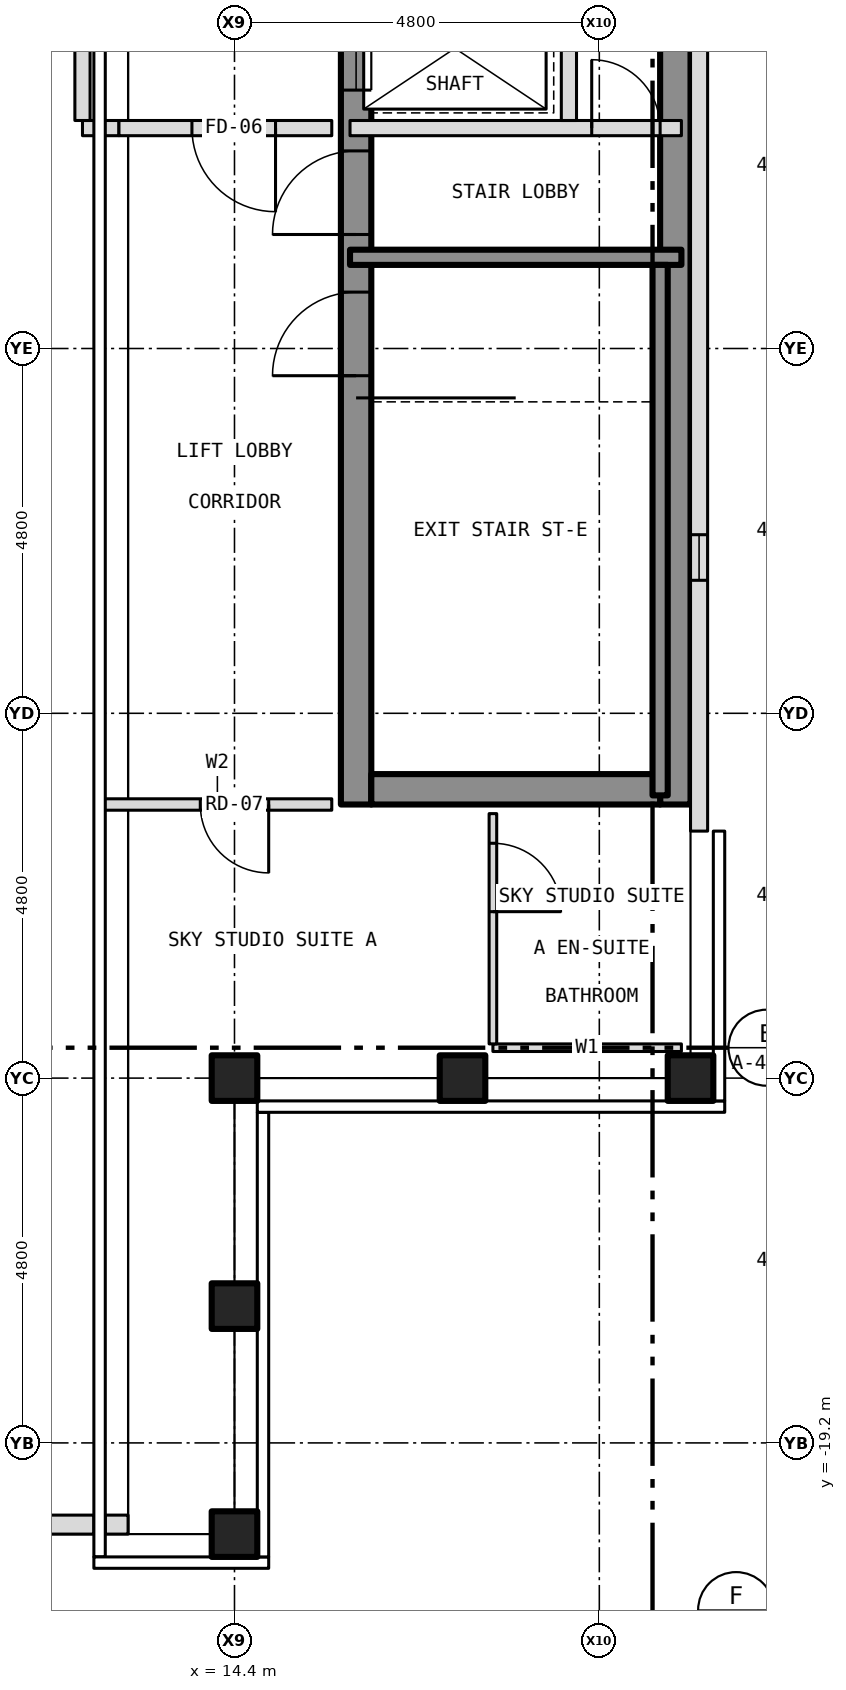
"""IFC4 building model, lengths in metres.
Left out: names, types, materials, properties, quantities, classifications, styles, units other than length and angle.
Written with IfcOpenShell. Run it as: python <this file> out.ifc"""

import sys

from ifc_helpers import new_model, si_unit, direction, frame, frame_2d, origin, origin_2d, place, context, subcontext, project, spatial, rectangle, hollow_rectangle, extrude, element, fill, save


model = new_model("IFC4")
c1 = context("Model", 3, precision=1e-05, world=origin(), true_north=direction((0.0, 1.0)))
c2 = subcontext(c1, "Body", "Model", "MODEL_VIEW")
j1 = project(units=[si_unit("LENGTHUNIT", "METRE"), si_unit("PLANEANGLEUNIT", "RADIAN")], contexts=[c1])
p1 = place(None, origin())
s1 = spatial("IfcSite", under=j1, at=p1, CompositionType="ELEMENT")
p2 = place(p1, origin())
s2 = spatial("IfcBuilding", under=s1, at=p2, CompositionType="ELEMENT")
p3 = place(p2, frame((0.0, 0.0, 286.5)))
s3 = spatial("IfcBuildingStorey", under=s2, at=p3, CompositionType="ELEMENT", Elevation=286.5)
for number, where, z_axis, x_axis in (
    (1, (14.4, -20.4, -0.15), (0.0, 0.0, 1.0), (1.0, 0.0, 0.0)),
    (2, (20.4, -14.4, -0.15), (0.0, 0.0, 1.0), (1.0, 0.0, 0.0)),
    (3, (14.4, -14.4, -0.15), (0.0, 0.0, 1.0), (1.0, 0.0, 0.0)),
    (4, (14.4, -17.4, -0.15), (0.0, 0.0, 1.0), (1.0, 0.0, 0.0)),
    (5, (17.4, -14.4, -0.15), (0.0, 0.0, 1.0), (1.0, 0.0, 0.0)),
):
    element("IfcColumn", number, at=place(p3, frame(where, z_axis=z_axis, x_axis=x_axis)), inside=s3, PredefinedType="COLUMN", context=c2, shape_type="SweptSolid", body=[
        extrude(hollow_rectangle(XDim=0.6, YDim=0.6, WallThickness=0.03, at=origin_2d()), origin(), (0.0, 0.0, 1.0), 3.45),
    ])
p4 = place(p3, frame((16.0, -10.8, 0.0), z_axis=(0.0, 0.0, 1.0), x_axis=(0.0, 1.0, 0.0)))
e6 = element("IfcWall", 6, at=p4, inside=s3, PredefinedType="SHEAR", context=c2, shape_type="SweptSolid", body=[
    extrude(rectangle(XDim=21.6, YDim=0.4, at=frame_2d((10.8, 0.0))), origin(), (0.0, 0.0, 1.0), 3.25),
])
p5 = place(p4, frame((9.4, 0.0, 0.0)))
e7 = element("IfcOpeningElement", 7, at=p5, cuts=e6, PredefinedType="OPENING", context=c2, shape_type="SweptSolid", body=[
    extrude(rectangle(XDim=1.1, YDim=2.1, at=frame_2d((0.55, 1.05))), frame((0.0, 0.212, 0.0), z_axis=(0.0, -1.0, 0.0), x_axis=(1.0, 0.0, 0.0)), (0.0, 0.0, 1.0), 0.424),
])
p6 = place(p4, frame((11.5, 0.0, 0.0)))
e8 = element("IfcOpeningElement", 8, at=p6, cuts=e6, PredefinedType="OPENING", context=c2, shape_type="SweptSolid", body=[
    extrude(rectangle(XDim=1.1, YDim=2.1, at=frame_2d((0.55, 1.05))), frame((0.0, 0.212, 0.0), z_axis=(0.0, -1.0, 0.0), x_axis=(1.0, 0.0, 0.0)), (0.0, 0.0, 1.0), 0.424),
])
p7 = place(p4, frame((13.6, 0.0, 0.0)))
e9 = element("IfcOpeningElement", 9, at=p7, cuts=e6, PredefinedType="OPENING", context=c2, shape_type="SweptSolid", body=[
    extrude(rectangle(XDim=1.1, YDim=2.1, at=frame_2d((0.55, 1.05))), frame((0.0, 0.212, 0.0), z_axis=(0.0, -1.0, 0.0), x_axis=(1.0, 0.0, 0.0)), (0.0, 0.0, 1.0), 0.424),
])
p8 = place(p4, frame((15.7, 0.0, 0.0)))
e10 = element("IfcOpeningElement", 10, at=p8, cuts=e6, PredefinedType="OPENING", context=c2, shape_type="SweptSolid", body=[
    extrude(rectangle(XDim=1.1, YDim=2.1, at=frame_2d((0.55, 1.05))), frame((0.0, 0.212, 0.0), z_axis=(0.0, -1.0, 0.0), x_axis=(1.0, 0.0, 0.0)), (0.0, 0.0, 1.0), 0.424),
])
p9 = place(p4, frame((17.8, 0.0, 0.0)))
e11 = element("IfcOpeningElement", 11, at=p9, cuts=e6, PredefinedType="OPENING", context=c2, shape_type="SweptSolid", body=[
    extrude(rectangle(XDim=1.1, YDim=2.1, at=frame_2d((0.55, 1.05))), frame((0.0, 0.212, 0.0), z_axis=(0.0, -1.0, 0.0), x_axis=(1.0, 0.0, 0.0)), (0.0, 0.0, 1.0), 0.424),
])
p10 = place(p4, frame((5.642, 0.0, 0.0)))
e12 = element("IfcOpeningElement", 12, at=p10, cuts=e6, PredefinedType="OPENING", context=c2, shape_type="SweptSolid", body=[
    extrude(rectangle(XDim=1.1, YDim=2.1, at=frame_2d((0.55, 1.05))), frame((0.0, 0.212, 0.0), z_axis=(0.0, -1.0, 0.0), x_axis=(1.0, 0.0, 0.0)), (0.0, 0.0, 1.0), 0.424),
])
p11 = place(p4, frame((7.5, 0.0, 0.0)))
e13 = element("IfcOpeningElement", 13, at=p11, cuts=e6, PredefinedType="OPENING", context=c2, shape_type="SweptSolid", body=[
    extrude(rectangle(XDim=1.1, YDim=2.1, at=frame_2d((0.55, 1.05))), frame((0.0, 0.212, 0.0), z_axis=(0.0, -1.0, 0.0), x_axis=(1.0, 0.0, 0.0)), (0.0, 0.0, 1.0), 0.424),
])
p12 = place(p4, frame((20.0, 0.0, 0.0)))
e14 = element("IfcOpeningElement", 14, at=p12, cuts=e6, PredefinedType="OPENING", context=c2, shape_type="SweptSolid", body=[
    extrude(rectangle(XDim=0.9, YDim=2.1, at=frame_2d((0.45, 1.05))), frame((0.0, 0.212, 0.0), z_axis=(0.0, -1.0, 0.0), x_axis=(1.0, 0.0, 0.0)), (0.0, 0.0, 1.0), 0.424),
])
p13 = place(p3, frame((20.2, -10.8, 0.0), z_axis=(0.0, 0.0, 1.0), x_axis=(0.0, 1.0, 0.0)))
e15 = element("IfcWall", 15, at=p13, inside=s3, PredefinedType="SHEAR", context=c2, shape_type="SweptSolid", body=[
    extrude(rectangle(XDim=21.6, YDim=0.4, at=frame_2d((10.8, 0.0))), origin(), (0.0, 0.0, 1.0), 3.25),
])
p14 = place(p3, frame((16.2, -10.6, 0.0), z_axis=(0.0, 0.0, 1.0), x_axis=(1.0, 0.0, 0.0)))
e16 = element("IfcWall", 16, at=p14, inside=s3, PredefinedType="SHEAR", context=c2, shape_type="SweptSolid", body=[
    extrude(rectangle(XDim=3.8, YDim=0.4, at=frame_2d((1.9, 0.0))), origin(), (0.0, 0.0, 1.0), 3.25),
])
p15 = place(p3, frame((20.512, -11.15, 0.0), z_axis=(0.0, 0.0, 1.0), x_axis=(0.0, 1.0, 0.0)))
e17 = element("IfcWall", 17, at=p15, inside=s3, PredefinedType="SOLIDWALL", context=c2, shape_type="SweptSolid", body=[
    extrude(rectangle(XDim=22.3, YDim=0.225, at=frame_2d((11.15, 0.0))), origin(), (0.0, 0.0, 1.0), 3.5),
])
p16 = place(p15, frame((3.3, 0.0, 1.0)))
e18 = element("IfcOpeningElement", 18, at=p16, cuts=e17, PredefinedType="OPENING", context=c2, shape_type="SweptSolid", body=[
    extrude(rectangle(XDim=0.6, YDim=1.5, at=frame_2d((0.3, 0.75))), frame((0.0, 0.125, 0.0), z_axis=(0.0, -1.0, 0.0), x_axis=(1.0, 0.0, 0.0)), (0.0, 0.0, 1.0), 0.249),
])
p17 = place(p3, frame((10.526, -20.275, 0.0), z_axis=(0.0, 0.0, 1.0), x_axis=(1.0, 0.0, 0.0)))
e19 = element("IfcWall", 19, at=p17, inside=s3, PredefinedType="PARAPET", context=c2, shape_type="SweptSolid", body=[
    extrude(rectangle(XDim=2.024, YDim=0.25, at=frame_2d((1.012, 0.0))), origin(), (0.0, 0.0, 1.0), 1.1),
])
p18 = place(p3, frame((12.7, -20.275, 0.0), z_axis=(0.0, 0.0, 1.0), x_axis=(1.0, 0.0, 0.0)))
e20 = element("IfcWall", 20, at=p18, inside=s3, PredefinedType="PARAPET", context=c2, shape_type="SweptSolid", body=[
    extrude(rectangle(XDim=0.3, YDim=0.25, at=frame_2d((0.15, 0.0))), origin(), (0.0, 0.0, 1.0), 1.1),
])
p19 = place(p3, frame((17.8, -14.0, 0.0), z_axis=(0.0, 0.0, 1.0), x_axis=(1.0, 0.0, 0.0)))
e21 = element("IfcWall", 21, at=p19, inside=s3, PredefinedType="PARTITIONING", context=c2, shape_type="SweptSolid", body=[
    extrude(rectangle(XDim=2.48, YDim=0.1, at=frame_2d((1.24, 0.0))), origin(), (0.0, 0.0, 1.0), 3.3),
])
p20 = place(p3, frame((12.67, -10.8, 0.0), z_axis=(0.0, 0.0, 1.0), x_axis=(1.0, 0.0, 0.0)))
e22 = element("IfcWall", 22, at=p20, inside=s3, PredefinedType="PARTITIONING", context=c2, shape_type="SweptSolid", body=[
    extrude(rectangle(XDim=3.01, YDim=0.15, at=frame_2d((1.505, 0.0))), origin(), (0.0, 0.0, 1.0), 3.3),
])
p21 = place(p20, frame((1.28, 0.0, 0.0)))
e23 = element("IfcOpeningElement", 23, at=p21, cuts=e22, PredefinedType="OPENING", context=c2, shape_type="SweptSolid", body=[
    extrude(rectangle(XDim=0.9, YDim=2.1, at=frame_2d((0.45, 1.05))), frame((0.0, 0.087, 0.0), z_axis=(0.0, -1.0, 0.0), x_axis=(1.0, 0.0, 0.0)), (0.0, 0.0, 1.0), 0.174),
])
p22 = place(p3, frame((15.92, -3.6, 0.0), z_axis=(0.0, 0.0, 1.0), x_axis=(1.0, 0.0, 0.0)))
e24 = element("IfcWall", 24, at=p22, inside=s3, PredefinedType="SHEAR", context=c2, shape_type="SweptSolid", body=[
    extrude(rectangle(XDim=4.36, YDim=0.2, at=frame_2d((2.18, 0.0))), origin(), (0.0, 0.0, 1.0), 3.25),
])
p23 = place(p3, frame((12.4, -1.9, 0.0), z_axis=(0.0, 0.0, 1.0), x_axis=(1.0, 0.0, 0.0)))
e25 = element("IfcWall", 25, at=p23, inside=s3, PredefinedType="PARTITIONING", context=c2, shape_type="SweptSolid", body=[
    extrude(rectangle(XDim=0.48, YDim=0.2, at=frame_2d((0.24, 0.0))), origin(), (0.0, 0.0, 1.0), 3.3),
])
p24 = place(p3, frame((12.88, -1.9, 0.0), z_axis=(0.0, 0.0, 1.0), x_axis=(1.0, 0.0, 0.0)))
e26 = element("IfcWall", 26, at=p24, inside=s3, PredefinedType="PARTITIONING", context=c2, shape_type="SweptSolid", body=[
    extrude(rectangle(XDim=2.8, YDim=0.2, at=frame_2d((1.4, 0.0))), origin(), (0.0, 0.0, 1.0), 3.3),
])
p25 = place(p24, frame((0.96, 0.0, 0.0)))
e27 = element("IfcOpeningElement", 27, at=p25, cuts=e26, PredefinedType="OPENING", context=c2, shape_type="SweptSolid", body=[
    extrude(rectangle(XDim=1.1, YDim=2.1, at=frame_2d((0.55, 1.05))), frame((0.0, 0.112, 0.0), z_axis=(0.0, -1.0, 0.0), x_axis=(1.0, 0.0, 0.0)), (0.0, 0.0, 1.0), 0.224),
])
p26 = place(p3, frame((15.92, -1.9, 0.0), z_axis=(0.0, 0.0, 1.0), x_axis=(1.0, 0.0, 0.0)))
e28 = element("IfcWall", 28, at=p26, inside=s3, PredefinedType="PARTITIONING", context=c2, shape_type="SweptSolid", body=[
    extrude(rectangle(XDim=4.36, YDim=0.2, at=frame_2d((2.18, 0.0))), origin(), (0.0, 0.0, 1.0), 3.25),
])
p27 = place(p26, frame((3.18, 0.0, 0.0)))
e29 = element("IfcOpeningElement", 29, at=p27, cuts=e28, PredefinedType="OPENING", context=c2, shape_type="SweptSolid", body=[
    extrude(rectangle(XDim=0.9, YDim=2.1, at=frame_2d((0.45, 1.05))), frame((0.0, 0.112, 0.0), z_axis=(0.0, -1.0, 0.0), x_axis=(1.0, 0.0, 0.0)), (0.0, 0.0, 1.0), 0.224),
])
p28 = place(p3, frame((12.4, -1.8, 0.0), z_axis=(0.0, 0.0, 1.0), x_axis=(0.0, 1.0, 0.0)))
e30 = element("IfcWall", 30, at=p28, inside=s3, PredefinedType="PARTITIONING", context=c2, shape_type="SweptSolid", body=[
    extrude(rectangle(XDim=4.0, YDim=0.2, at=frame_2d((2.0, 0.0))), origin(), (0.0, 0.0, 1.0), 3.3),
])
p29 = place(p3, frame((17.8, -13.95, 0.0), z_axis=(0.0, 0.0, 1.0), x_axis=(0.0, 1.0, 0.0)))
e31 = element("IfcWall", 31, at=p29, inside=s3, PredefinedType="PARTITIONING", context=c2, shape_type="SweptSolid", body=[
    extrude(rectangle(XDim=3.03, YDim=0.1, at=frame_2d((1.515, 0.0))), origin(), (0.0, 0.0, 1.0), 3.3),
])
p30 = place(p29, frame((1.74, 0.0, 0.0)))
e32 = element("IfcOpeningElement", 32, at=p30, cuts=e31, PredefinedType="OPENING", context=c2, shape_type="SweptSolid", body=[
    extrude(rectangle(XDim=0.9, YDim=2.1, at=frame_2d((0.45, 1.05))), frame((0.0, 0.062, 0.0), z_axis=(0.0, -1.0, 0.0), x_axis=(1.0, 0.0, 0.0)), (0.0, 0.0, 1.0), 0.124),
])
p31 = place(p3, frame((18.8, -1.8, 0.0), z_axis=(0.0, 0.0, 1.0), x_axis=(0.0, 1.0, 0.0)))
e33 = element("IfcWall", 33, at=p31, inside=s3, PredefinedType="PARTITIONING", context=c2, shape_type="SweptSolid", body=[
    extrude(rectangle(XDim=10.3, YDim=0.2, at=frame_2d((5.15, 0.0))), origin(), (0.0, 0.0, 1.0), 3.25),
])
p32 = place(p3, frame((20.0, -10.68, 0.0), z_axis=(0.0, 0.0, 1.0), x_axis=(0.0, 1.0, 0.0)))
e34 = element("IfcWall", 34, at=p32, inside=s3, PredefinedType="SHEAR", context=c2, shape_type="SweptSolid", body=[
    extrude(rectangle(XDim=6.98, YDim=0.2, at=frame_2d((3.49, 0.0))), origin(), (0.0, 0.0, 1.0), 3.25),
])
p33 = place(p2, frame((0.0, 0.0, 290.0)))
p34 = place(p33, frame((0.0, 0.0, -0.25)))
p35 = place(p34, frame((19.0, -4.64, 0.0)))
p36 = place(p35, frame((0.0, 0.0, 0.2)))
e35 = element("IfcWindow", 35, at=p36, inside=s3, PartitioningType="SINGLE_PANEL", PredefinedType="SKYLIGHT", context=c2, shape_type="SweptSolid", body=[
    extrude(rectangle(XDim=0.9, YDim=0.9, at=origin_2d()), origin(), (0.0, 0.0, 1.0), 0.05),
])
p37 = place(p16, origin())
e36 = element("IfcWindow", 36, at=p37, inside=s3, PartitioningType="SINGLE_PANEL", PredefinedType="WINDOW", context=c2, shape_type="SweptSolid", body=[
    extrude(rectangle(XDim=0.6, YDim=1.5, at=frame_2d((0.3, 0.75))), frame((0.0, -0.022, 0.0), z_axis=(0.0, -1.0, 0.0), x_axis=(1.0, 0.0, 0.0)), (0.0, 0.0, 1.0), 0.06),
])
fill(e18, e36)
p38 = place(p5, origin())
e37 = element("IfcDoor", 37, at=p38, inside=s3, OperationType="SLIDING_TO_LEFT", PredefinedType="DOOR", context=c2, shape_type="SweptSolid", body=[
    extrude(rectangle(XDim=1.1, YDim=2.1, at=frame_2d((0.55, 1.05))), frame((0.0, 0.025, 0.0), z_axis=(0.0, -1.0, 0.0), x_axis=(1.0, 0.0, 0.0)), (0.0, 0.0, 1.0), 0.05),
])
fill(e7, e37)
p39 = place(p10, origin())
e38 = element("IfcDoor", 38, at=p39, inside=s3, OperationType="SINGLE_SWING_LEFT", PredefinedType="DOOR", context=c2, shape_type="SweptSolid", body=[
    extrude(rectangle(XDim=1.1, YDim=2.1, at=frame_2d((0.55, 1.05))), frame((0.0, 0.025, 0.0), z_axis=(0.0, -1.0, 0.0), x_axis=(1.0, 0.0, 0.0)), (0.0, 0.0, 1.0), 0.05),
])
fill(e12, e38)
p40 = place(p11, origin())
e39 = element("IfcDoor", 39, at=p40, inside=s3, OperationType="SINGLE_SWING_LEFT", PredefinedType="DOOR", context=c2, shape_type="SweptSolid", body=[
    extrude(rectangle(XDim=1.1, YDim=2.1, at=frame_2d((0.55, 1.05))), frame((0.0, 0.025, 0.0), z_axis=(0.0, -1.0, 0.0), x_axis=(1.0, 0.0, 0.0)), (0.0, 0.0, 1.0), 0.05),
])
fill(e13, e39)
p41 = place(p27, origin())
e40 = element("IfcDoor", 40, at=p41, inside=s3, OperationType="SINGLE_SWING_LEFT", PredefinedType="DOOR", context=c2, shape_type="SweptSolid", body=[
    extrude(rectangle(XDim=0.9, YDim=2.1, at=frame_2d((0.45, 1.05))), frame((0.0, 0.025, 0.0), z_axis=(0.0, -1.0, 0.0), x_axis=(1.0, 0.0, 0.0)), (0.0, 0.0, 1.0), 0.05),
])
fill(e29, e40)
p42 = place(p25, origin())
e41 = element("IfcDoor", 41, at=p42, inside=s3, OperationType="SINGLE_SWING_RIGHT", PredefinedType="DOOR", context=c2, shape_type="SweptSolid", body=[
    extrude(rectangle(XDim=1.1, YDim=2.1, at=frame_2d((0.55, 1.05))), frame((0.0, 0.025, 0.0), z_axis=(0.0, -1.0, 0.0), x_axis=(1.0, 0.0, 0.0)), (0.0, 0.0, 1.0), 0.05),
])
fill(e27, e41)
p43 = place(p21, origin())
e42 = element("IfcDoor", 42, at=p43, inside=s3, OperationType="SINGLE_SWING_RIGHT", PredefinedType="DOOR", context=c2, shape_type="SweptSolid", body=[
    extrude(rectangle(XDim=0.9, YDim=2.1, at=frame_2d((0.45, 1.05))), frame((0.0, 0.025, 0.0), z_axis=(0.0, -1.0, 0.0), x_axis=(1.0, 0.0, 0.0)), (0.0, 0.0, 1.0), 0.05),
])
fill(e23, e42)
p44 = place(p30, origin())
e43 = element("IfcDoor", 43, at=p44, inside=s3, OperationType="SINGLE_SWING_LEFT", PredefinedType="DOOR", context=c2, shape_type="SweptSolid", body=[
    extrude(rectangle(XDim=0.9, YDim=2.1, at=frame_2d((0.45, 1.05))), frame((0.0, 0.025, 0.0), z_axis=(0.0, -1.0, 0.0), x_axis=(1.0, 0.0, 0.0)), (0.0, 0.0, 1.0), 0.05),
])
fill(e32, e43)
save(model, sys.argv[1])
